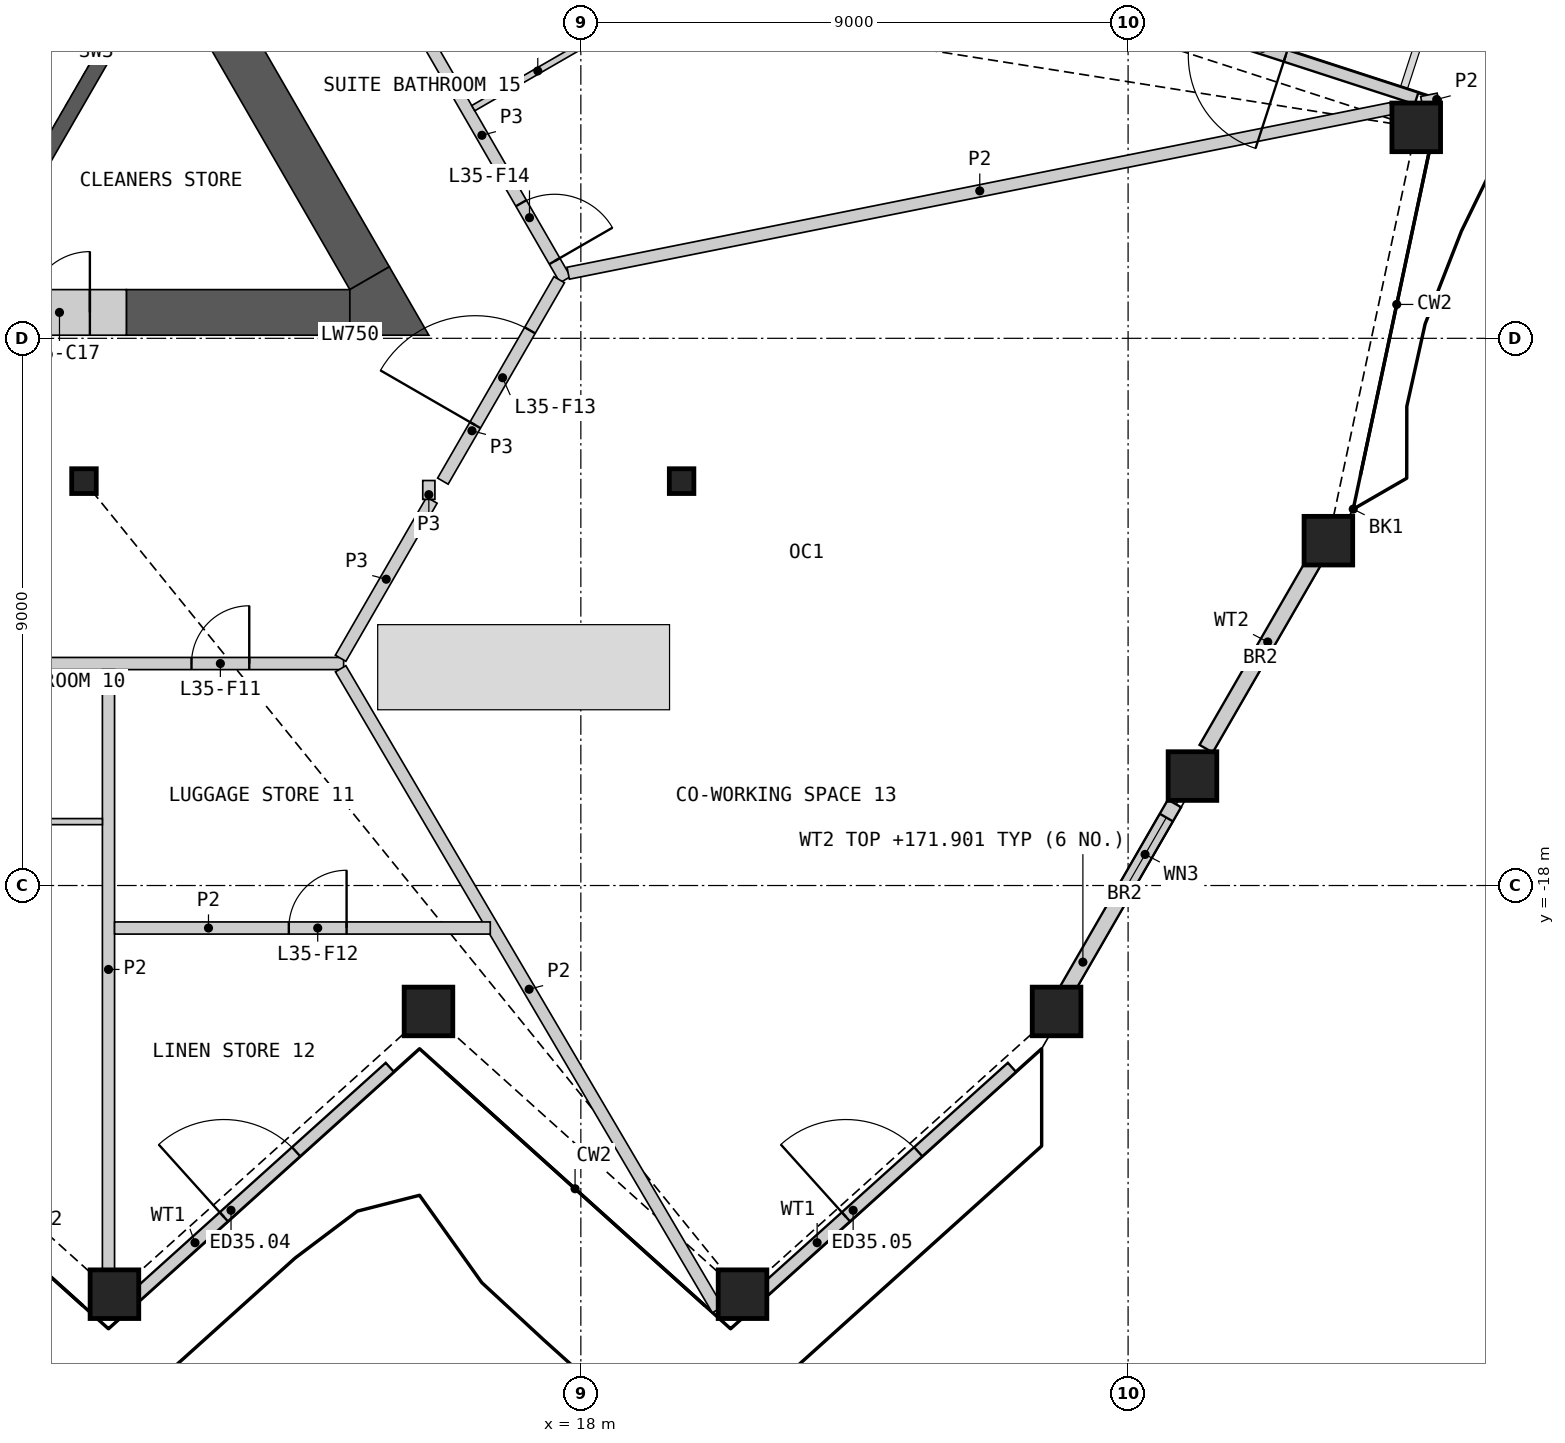
"""IFC4 building model, lengths in metres.
Left out: names, types, materials, properties, quantities, classifications, styles, units other than length and angle.
Written with IfcOpenShell. Run it as: python <this file> out.ifc"""

import sys

from ifc_helpers import new_model, si_unit, direction, frame, frame_2d, origin, origin_2d, place, context, subcontext, project, spatial, polyline, rectangle, hollow_rectangle, i_section, outline, extrude, element, fill, save


model = new_model("IFC4")
c1 = context("Model", 3, precision=1e-05, world=origin(), true_north=direction((0.0, 1.0)))
c2 = subcontext(c1, "Body", "Model", "MODEL_VIEW")
j1 = project(units=[si_unit("LENGTHUNIT", "METRE"), si_unit("PLANEANGLEUNIT", "RADIAN")], contexts=[c1])
p1 = place(None, origin())
s1 = spatial("IfcSite", under=j1, at=p1, CompositionType="ELEMENT")
p2 = place(p1, origin())
s2 = spatial("IfcBuilding", under=s1, at=p2, CompositionType="ELEMENT")
p3 = place(p2, frame((0.0, 0.0, 169.2)))
s3 = spatial("IfcBuildingStorey", under=s2, at=p3, CompositionType="ELEMENT", Elevation=169.2)
for number, where, z_axis, x_axis in (
    (1, (10.329, -24.722, 0.0), (0.0, 0.0, 1.0), (1.0, 0.0, 0.0)),
    (2, (15.494, -20.071, 0.0), (0.0, 0.0, 1.0), (1.0, 0.0, 0.0)),
    (3, (20.659, -24.722, 0.0), (0.0, 0.0, 1.0), (1.0, 0.0, 0.0)),
    (4, (25.823, -20.071, 0.0), (0.0, 0.0, 1.0), (1.0, 0.0, 0.0)),
    (5, (28.059, -16.2, 0.0), (0.0, 0.0, 1.0), (1.0, 0.0, 0.0)),
    (6, (30.294, -12.328, 0.0), (0.0, 0.0, 1.0), (1.0, 0.0, 0.0)),
    (7, (31.739, -5.53, 0.0), (0.0, 0.0, 1.0), (1.0, 0.0, 0.0)),
):
    element("IfcColumn", number, at=place(p3, frame(where, z_axis=z_axis, x_axis=x_axis)), inside=s3, PredefinedType="COLUMN", context=c2, shape_type="SweptSolid", body=[
        extrude(hollow_rectangle(XDim=0.8, YDim=0.8, WallThickness=0.05, at=origin_2d()), origin(), (0.0, 0.0, 1.0), 3.6),
    ])
for number, where, z_axis, x_axis in (
    (8, (9.828, -11.349, 0.0), (0.0, 0.0, 1.0), (1.0, 0.0, 0.0)),
    (9, (19.657, -11.349, 0.0), (0.0, 0.0, 1.0), (1.0, 0.0, 0.0)),
):
    element("IfcColumn", number, at=place(p3, frame(where, z_axis=z_axis, x_axis=x_axis)), inside=s3, PredefinedType="COLUMN", context=c2, shape_type="SweptSolid", body=[
        extrude(i_section(OverallWidth=0.404, OverallDepth=0.407, WebThickness=0.027, FlangeThickness=0.044, at=origin_2d()), origin(), (0.0, 0.0, 1.0), 3.6),
    ])
p4 = place(p3, frame((10.587, -24.836, 0.0), z_axis=(0.0, 0.0, 1.0), x_axis=(0.74315473474, 0.669119600844, 0.0)))
e10 = element("IfcWall", 10, at=p4, inside=s3, PredefinedType="SOLIDWALL", context=c2, shape_type="SweptSolid", body=[
    extrude(rectangle(XDim=5.748, YDim=0.2, at=frame_2d((2.874, 0.0))), origin(), (0.0, 0.0, 1.0), 2.701),
])
p5 = place(p4, frame((2.074, 0.0, 0.0)))
e11 = element("IfcOpeningElement", 11, at=p5, cuts=e10, PredefinedType="OPENING", context=c2, shape_type="SweptSolid", body=[
    extrude(rectangle(XDim=1.6, YDim=2.4, at=frame_2d((0.8, 1.2))), frame((0.0, 0.11, 0.0), z_axis=(0.0, -1.0, 0.0), x_axis=(1.0, 0.0, 0.0)), (0.0, 0.0, 1.0), 0.22),
])
p6 = place(p3, frame((20.818, -24.836, 0.0), z_axis=(0.0, 0.0, 1.0), x_axis=(0.74315473474, 0.669119600844, 0.0)))
e12 = element("IfcWall", 12, at=p6, inside=s3, PredefinedType="SOLIDWALL", context=c2, shape_type="SweptSolid", body=[
    extrude(rectangle(XDim=5.748, YDim=0.2, at=frame_2d((2.874, 0.0))), origin(), (0.0, 0.0, 1.0), 2.701),
])
p7 = place(p6, frame((2.074, 0.0, 0.0)))
e13 = element("IfcOpeningElement", 13, at=p7, cuts=e12, PredefinedType="OPENING", context=c2, shape_type="SweptSolid", body=[
    extrude(rectangle(XDim=1.6, YDim=2.4, at=frame_2d((0.8, 1.2))), frame((0.0, 0.11, 0.0), z_axis=(0.0, -1.0, 0.0), x_axis=(1.0, 0.0, 0.0)), (0.0, 0.0, 1.0), 0.22),
])
p8 = place(p3, frame((25.754, -20.13, 0.0), z_axis=(0.0, 0.0, 1.0), x_axis=(0.500039726511, 0.866002466458, 0.0)))
e14 = element("IfcWall", 14, at=p8, inside=s3, PredefinedType="SOLIDWALL", context=c2, shape_type="SweptSolid", body=[
    extrude(rectangle(XDim=4.019, YDim=0.25, at=frame_2d((2.009, 0.0))), origin(), (0.0, 0.0, 1.0), 2.701),
])
p9 = place(p8, frame((2.35, 0.0, 1.7)))
e15 = element("IfcOpeningElement", 15, at=p9, cuts=e14, PredefinedType="OPENING", context=c2, shape_type="SweptSolid", body=[
    extrude(rectangle(XDim=1.4, YDim=0.8, at=frame_2d((0.7, 0.4))), frame((0.0, 0.135, 0.0), z_axis=(0.0, -1.0, 0.0), x_axis=(1.0, 0.0, 0.0)), (0.0, 0.0, 1.0), 0.27),
])
p10 = place(p3, frame((28.283, -15.75, 0.0), z_axis=(0.0, 0.0, 1.0), x_axis=(0.500005680777, 0.866022123962, 0.0)))
e16 = element("IfcWall", 16, at=p10, inside=s3, PredefinedType="SOLIDWALL", context=c2, shape_type="SweptSolid", body=[
    extrude(rectangle(XDim=4.054, YDim=0.25, at=frame_2d((2.027, 0.0))), origin(), (0.0, 0.0, 1.0), 2.701),
])
p11 = place(p3, frame((31.743, -5.054, 0.0), z_axis=(0.0, 0.0, 1.0), x_axis=(-0.951061260164, 0.309002393867, 0.0)))
e17 = element("IfcWall", 17, at=p11, inside=s3, PredefinedType="SOLIDWALL", context=c2, shape_type="SweptSolid", body=[
    extrude(rectangle(XDim=5.938, YDim=0.2, at=frame_2d((2.969, 0.0))), origin(), (0.0, 0.0, 1.0), 2.701),
])
p12 = place(p11, frame((2.264, 0.0, 0.0)))
e18 = element("IfcOpeningElement", 18, at=p12, cuts=e17, PredefinedType="OPENING", context=c2, shape_type="SweptSolid", body=[
    extrude(rectangle(XDim=1.6, YDim=2.4, at=frame_2d((0.8, 1.2))), frame((0.0, 0.11, 0.0), z_axis=(0.0, -1.0, 0.0), x_axis=(1.0, 0.0, 0.0)), (0.0, 0.0, 1.0), 0.22),
])
p13 = place(p3, origin())
e19 = element("IfcWall", 19, at=p13, inside=s3, PredefinedType="SHEAR", context=c2, shape_type="SweptSolid", body=[
    extrude(outline(polyline([(8.83, -6.881), (10.374, -4.206), (10.032, -4.298), (8.738, -6.539), (8.83, -6.881)])), origin(), (0.0, 0.0, 1.0), 3.25),
])
p14 = place(p3, origin())
e20 = element("IfcWall", 20, at=p14, inside=s3, PredefinedType="SHEAR", context=c2, shape_type="SweptSolid", body=[
    extrude(outline(polyline([(10.032, -4.298), (10.374, -4.206), (5.307, -1.281), (5.182, -1.498), (10.032, -4.298)])), origin(), (0.0, 0.0, 1.0), 3.25),
])
p15 = place(p3, frame((10.525, -8.574, 0.0), z_axis=(0.0, 0.0, 1.0), x_axis=(1.0, 0.0, 0.0)))
e21 = element("IfcWall", 21, at=p15, inside=s3, PredefinedType="SHEAR", context=c2, shape_type="SweptSolid", body=[
    extrude(rectangle(XDim=3.676, YDim=0.75, at=frame_2d((1.838, 0.0))), origin(), (0.0, 0.0, 1.0), 3.25),
])
p16 = place(p3, frame((14.526, -8.011, 0.0), z_axis=(0.0, 0.0, 1.0), x_axis=(-0.499994855372, 0.866028374016, 0.0)))
e22 = element("IfcWall", 22, at=p16, inside=s3, PredefinedType="SHEAR", context=c2, shape_type="SweptSolid", body=[
    extrude(rectangle(XDim=14.301, YDim=0.75, at=frame_2d((7.15, 0.0))), origin(), (0.0, 0.0, 1.0), 3.25),
])
p17 = place(p3, origin())
e23 = element("IfcWall", 23, at=p17, inside=s3, PredefinedType="SHEAR", context=c2, shape_type="SweptSolid", body=[
    extrude(outline(polyline([(14.201, -8.949), (14.201, -8.199), (14.851, -7.824), (15.5, -8.949), (14.201, -8.949)])), origin(), (0.0, 0.0, 1.0), 3.25),
])
p18 = place(p3, frame((8.325, -8.574, 0.0), z_axis=(0.0, 0.0, 1.0), x_axis=(1.0, 0.0, 0.0)))
e24 = element("IfcWall", 24, at=p18, inside=s3, PredefinedType="SHEAR", context=c2, shape_type="SweptSolid", body=[
    extrude(rectangle(XDim=2.2, YDim=0.75, at=frame_2d((1.1, 0.0))), origin(), (0.0, 0.0, 1.0), 3.25),
])
p19 = place(p18, frame((0.6, 0.0, 0.0)))
e25 = element("IfcOpeningElement", 25, at=p19, cuts=e24, PredefinedType="OPENING", context=c2, shape_type="SweptSolid", body=[
    extrude(rectangle(XDim=1.0, YDim=2.1, at=frame_2d((0.5, 1.05))), frame((0.0, 0.385, 0.0), z_axis=(0.0, -1.0, 0.0), x_axis=(1.0, 0.0, 0.0)), (0.0, 0.0, 1.0), 0.77),
])
p20 = place(p3, frame((-14.099, -14.349, 0.0), z_axis=(0.0, 0.0, 1.0), x_axis=(1.0, 0.0, 0.0)))
e26 = element("IfcWall", 26, at=p20, inside=s3, PredefinedType="PARTITIONING", context=c2, shape_type="SweptSolid", body=[
    extrude(rectangle(XDim=28.198, YDim=0.2, at=frame_2d((14.099, 0.0))), origin(), (0.0, 0.0, 1.0), 3.25),
])
p21 = place(p20, frame((1.552, 0.0, 0.0)))
e27 = element("IfcOpeningElement", 27, at=p21, cuts=e26, PredefinedType="OPENING", context=c2, shape_type="SweptSolid", body=[
    extrude(rectangle(XDim=0.95, YDim=2.1, at=frame_2d((0.475, 1.05))), frame((0.0, 0.11, 0.0), z_axis=(0.0, -1.0, 0.0), x_axis=(1.0, 0.0, 0.0)), (0.0, 0.0, 1.0), 0.22),
])
p22 = place(p20, frame((7.677, 0.0, 0.0)))
e28 = element("IfcOpeningElement", 28, at=p22, cuts=e26, PredefinedType="OPENING", context=c2, shape_type="SweptSolid", body=[
    extrude(rectangle(XDim=1.0, YDim=2.1, at=frame_2d((0.5, 1.05))), frame((0.0, 0.11, 0.0), z_axis=(0.0, -1.0, 0.0), x_axis=(1.0, 0.0, 0.0)), (0.0, 0.0, 1.0), 0.22),
])
p23 = place(p20, frame((9.283, 0.0, 0.0)))
e29 = element("IfcOpeningElement", 29, at=p23, cuts=e26, PredefinedType="OPENING", context=c2, shape_type="SweptSolid", body=[
    extrude(rectangle(XDim=1.0, YDim=2.1, at=frame_2d((0.5, 1.05))), frame((0.0, 0.11, 0.0), z_axis=(0.0, -1.0, 0.0), x_axis=(1.0, 0.0, 0.0)), (0.0, 0.0, 1.0), 0.22),
])
p24 = place(p20, frame((17.915, 0.0, 0.0)))
e30 = element("IfcOpeningElement", 30, at=p24, cuts=e26, PredefinedType="OPENING", context=c2, shape_type="SweptSolid", body=[
    extrude(rectangle(XDim=1.0, YDim=2.1, at=frame_2d((0.5, 1.05))), frame((0.0, 0.11, 0.0), z_axis=(0.0, -1.0, 0.0), x_axis=(1.0, 0.0, 0.0)), (0.0, 0.0, 1.0), 0.22),
])
p25 = place(p20, frame((19.521, 0.0, 0.0)))
e31 = element("IfcOpeningElement", 31, at=p25, cuts=e26, PredefinedType="OPENING", context=c2, shape_type="SweptSolid", body=[
    extrude(rectangle(XDim=1.0, YDim=2.1, at=frame_2d((0.5, 1.05))), frame((0.0, 0.11, 0.0), z_axis=(0.0, -1.0, 0.0), x_axis=(1.0, 0.0, 0.0)), (0.0, 0.0, 1.0), 0.22),
])
p26 = place(p20, frame((25.696, 0.0, 0.0)))
e32 = element("IfcOpeningElement", 32, at=p26, cuts=e26, PredefinedType="OPENING", context=c2, shape_type="SweptSolid", body=[
    extrude(rectangle(XDim=0.95, YDim=2.1, at=frame_2d((0.475, 1.05))), frame((0.0, 0.11, 0.0), z_axis=(0.0, -1.0, 0.0), x_axis=(1.0, 0.0, 0.0)), (0.0, 0.0, 1.0), 0.22),
])
p27 = place(p3, frame((15.002, -3.286, 0.0), z_axis=(0.0, 0.0, 1.0), x_axis=(0.500007607708, -0.866021011428, 0.0)))
e33 = element("IfcWall", 33, at=p27, inside=s3, PredefinedType="PARTITIONING", context=c2, shape_type="SweptSolid", body=[
    extrude(rectangle(XDim=5.484, YDim=0.2, at=frame_2d((2.742, 0.0))), origin(), (0.0, 0.0, 1.0), 3.25),
])
p28 = place(p27, frame((4.032, 0.0, 0.0)))
e34 = element("IfcOpeningElement", 34, at=p28, cuts=e33, PredefinedType="OPENING", context=c2, shape_type="SweptSolid", body=[
    extrude(rectangle(XDim=1.1, YDim=2.1, at=frame_2d((0.55, 1.05))), frame((0.0, 0.11, 0.0), z_axis=(0.0, -1.0, 0.0), x_axis=(1.0, 0.0, 0.0)), (0.0, 0.0, 1.0), 0.22),
])
p29 = place(p3, frame((15.731, -11.349, 0.0), z_axis=(0.0, 0.0, 1.0), x_axis=(0.499961815444, 0.866047448526, 0.0)))
e35 = element("IfcWall", 35, at=p29, inside=s3, PredefinedType="PARTITIONING", context=c2, shape_type="SweptSolid", body=[
    extrude(rectangle(XDim=3.826, YDim=0.2, at=frame_2d((1.913, 0.0))), origin(), (0.0, 0.0, 1.0), 3.25),
])
p30 = place(p29, frame((1.064, 0.0, 0.0)))
e36 = element("IfcOpeningElement", 36, at=p30, cuts=e35, PredefinedType="OPENING", context=c2, shape_type="SweptSolid", body=[
    extrude(rectangle(XDim=1.8, YDim=2.1, at=frame_2d((0.9, 1.05))), frame((0.0, 0.11, 0.0), z_axis=(0.0, -1.0, 0.0), x_axis=(1.0, 0.0, 0.0)), (0.0, 0.0, 1.0), 0.22),
])
p31 = place(p3, frame((14.049, -14.262, 0.0), z_axis=(0.0, 0.0, 1.0), x_axis=(0.500048608389, 0.865997337899, 0.0)))
e37 = element("IfcWall", 37, at=p31, inside=s3, PredefinedType="PARTITIONING", context=c2, shape_type="SweptSolid", body=[
    extrude(rectangle(XDim=3.002, YDim=0.2, at=frame_2d((1.501, 0.0))), origin(), (0.0, 0.0, 1.0), 3.25),
])
p32 = place(p3, frame((15.5, -11.649, 0.0), z_axis=(0.0, 0.0, 1.0), x_axis=(0.0, 1.0, 0.0)))
e38 = element("IfcWall", 38, at=p32, inside=s3, PredefinedType="PARTITIONING", context=c2, shape_type="SweptSolid", body=[
    extrude(rectangle(XDim=0.31, YDim=0.2, at=frame_2d((0.155, 0.0))), origin(), (0.0, 0.0, 1.0), 3.25),
])
p33 = place(p3, frame((17.792, -7.929, 0.0), z_axis=(0.0, 0.0, 1.0), x_axis=(0.980565709097, 0.196190953266, 0.0)))
e39 = element("IfcWall", 39, at=p33, inside=s3, PredefinedType="PARTITIONING", context=c2, shape_type="SweptSolid", body=[
    extrude(rectangle(XDim=13.805, YDim=0.2, at=frame_2d((6.903, 0.0))), origin(), (0.0, 0.0, 1.0), 2.404),
])
p34 = place(p3, frame((14.05, -14.435, 0.0), z_axis=(0.0, 0.0, 1.0), x_axis=(0.50691019554, -0.861998871031, 0.0)))
e40 = element("IfcWall", 40, at=p34, inside=s3, PredefinedType="PARTITIONING", context=c2, shape_type="SweptSolid", body=[
    extrude(rectangle(XDim=12.229, YDim=0.2, at=frame_2d((6.115, 0.0))), origin(), (0.0, 0.0, 1.0), 2.404),
])
p35 = place(p3, frame((10.231, -24.312, 0.0), z_axis=(0.0, 0.0, 1.0), x_axis=(0.0, 1.0, 0.0)))
e41 = element("IfcWall", 41, at=p35, inside=s3, PredefinedType="PARTITIONING", context=c2, shape_type="SweptSolid", body=[
    extrude(rectangle(XDim=9.863, YDim=0.2, at=frame_2d((4.931, 0.0))), origin(), (0.0, 0.0, 1.0), 2.404),
])
p36 = place(p3, frame((10.331, -18.699, 0.0), z_axis=(0.0, 0.0, 1.0), x_axis=(1.0, 0.0, 0.0)))
e42 = element("IfcWall", 42, at=p36, inside=s3, PredefinedType="PARTITIONING", context=c2, shape_type="SweptSolid", body=[
    extrude(rectangle(XDim=6.179, YDim=0.2, at=frame_2d((3.09, 0.0))), origin(), (0.0, 0.0, 1.0), 2.404),
])
p37 = place(p36, frame((2.866, 0.0, 0.0)))
e43 = element("IfcOpeningElement", 43, at=p37, cuts=e42, PredefinedType="OPENING", context=c2, shape_type="SweptSolid", body=[
    extrude(rectangle(XDim=0.95, YDim=2.1, at=frame_2d((0.475, 1.05))), frame((0.0, 0.11, 0.0), z_axis=(0.0, -1.0, 0.0), x_axis=(1.0, 0.0, 0.0)), (0.0, 0.0, 1.0), 0.22),
])
p38 = place(p3, frame((31.831, -5.12, 0.0), z_axis=(0.0, 0.0, 1.0), x_axis=(0.980512850695, 0.19645495571, 0.0)))
e44 = element("IfcWall", 44, at=p38, inside=s3, PredefinedType="PARTITIONING", context=c2, shape_type="SweptSolid", body=[
    extrude(rectangle(XDim=0.277, YDim=0.2, at=frame_2d((0.139, 0.0))), origin(), (0.0, 0.0, 1.0), 2.404),
])
p39 = place(p3, frame((7.481, -16.949, 0.0), z_axis=(0.0, 0.0, 1.0), x_axis=(1.0, 0.0, 0.0)))
e45 = element("IfcWall", 45, at=p39, inside=s3, PredefinedType="PARTITIONING", context=c2, shape_type="SweptSolid", body=[
    extrude(rectangle(XDim=2.65, YDim=0.1, at=frame_2d((1.325, 0.0))), origin(), (0.0, 0.0, 1.0), 2.404),
])
p40 = place(p39, frame((0.25, 0.0, 0.0)))
e46 = element("IfcOpeningElement", 46, at=p40, cuts=e45, PredefinedType="OPENING", context=c2, shape_type="SweptSolid", body=[
    extrude(rectangle(XDim=0.95, YDim=2.1, at=frame_2d((0.475, 1.05))), frame((0.0, 0.06, 0.0), z_axis=(0.0, -1.0, 0.0), x_axis=(1.0, 0.0, 0.0)), (0.0, 0.0, 1.0), 0.12),
])
p41 = place(p3, frame((16.231, -5.215, 0.0), z_axis=(0.0, 0.0, 1.0), x_axis=(0.866057815567, 0.499943856944, 0.0)))
e47 = element("IfcWall", 47, at=p41, inside=s3, PredefinedType="PARTITIONING", context=c2, shape_type="SweptSolid", body=[
    extrude(rectangle(XDim=2.45, YDim=0.1, at=frame_2d((1.225, 0.0))), origin(), (0.0, 0.0, 1.0), 2.404),
])
p42 = place(p5, origin())
e48 = element("IfcDoor", 48, at=p42, inside=s3, OperationType="DOUBLE_DOOR_SINGLE_SWING", PredefinedType="DOOR", context=c2, shape_type="SweptSolid", body=[
    extrude(rectangle(XDim=1.6, YDim=2.4, at=frame_2d((0.8, 1.2))), frame((0.0, 0.025, 0.0), z_axis=(0.0, -1.0, 0.0), x_axis=(1.0, 0.0, 0.0)), (0.0, 0.0, 1.0), 0.05),
])
fill(e11, e48)
p43 = place(p7, origin())
e49 = element("IfcDoor", 49, at=p43, inside=s3, OperationType="DOUBLE_DOOR_SINGLE_SWING", PredefinedType="DOOR", context=c2, shape_type="SweptSolid", body=[
    extrude(rectangle(XDim=1.6, YDim=2.4, at=frame_2d((0.8, 1.2))), frame((0.0, 0.025, 0.0), z_axis=(0.0, -1.0, 0.0), x_axis=(1.0, 0.0, 0.0)), (0.0, 0.0, 1.0), 0.05),
])
fill(e13, e49)
p44 = place(p9, origin())
e50 = element("IfcWindow", 50, at=p44, inside=s3, PartitioningType="SINGLE_PANEL", PredefinedType="WINDOW", context=c2, shape_type="SweptSolid", body=[
    extrude(rectangle(XDim=1.4, YDim=0.8, at=frame_2d((0.7, 0.4))), frame((0.0, 0.03, 0.0), z_axis=(0.0, -1.0, 0.0), x_axis=(1.0, 0.0, 0.0)), (0.0, 0.0, 1.0), 0.06),
])
fill(e15, e50)
p45 = place(p12, origin())
e51 = element("IfcDoor", 51, at=p45, inside=s3, OperationType="DOUBLE_DOOR_SINGLE_SWING", PredefinedType="DOOR", context=c2, shape_type="SweptSolid", body=[
    extrude(rectangle(XDim=1.6, YDim=2.4, at=frame_2d((0.8, 1.2))), frame((0.0, 0.025, 0.0), z_axis=(0.0, -1.0, 0.0), x_axis=(1.0, 0.0, 0.0)), (0.0, 0.0, 1.0), 0.05),
])
fill(e18, e51)
p46 = place(p19, origin())
e52 = element("IfcDoor", 52, at=p46, inside=s3, OperationType="SINGLE_SWING_RIGHT", PredefinedType="DOOR", context=c2, shape_type="SweptSolid", body=[
    extrude(rectangle(XDim=1.0, YDim=2.1, at=frame_2d((0.5, 1.05))), frame((0.0, 0.13, 0.0), z_axis=(0.0, -1.0, 0.0), x_axis=(1.0, 0.0, 0.0)), (0.0, 0.0, 1.0), 0.05),
])
fill(e25, e52)
p47 = place(p26, origin())
e53 = element("IfcDoor", 53, at=p47, inside=s3, OperationType="SINGLE_SWING_RIGHT", PredefinedType="DOOR", context=c2, shape_type="SweptSolid", body=[
    extrude(rectangle(XDim=0.95, YDim=2.1, at=frame_2d((0.475, 1.05))), frame((0.0, 0.025, 0.0), z_axis=(0.0, -1.0, 0.0), x_axis=(1.0, 0.0, 0.0)), (0.0, 0.0, 1.0), 0.05),
])
fill(e32, e53)
p48 = place(p37, origin())
e54 = element("IfcDoor", 54, at=p48, inside=s3, OperationType="SINGLE_SWING_RIGHT", PredefinedType="DOOR", context=c2, shape_type="SweptSolid", body=[
    extrude(rectangle(XDim=0.95, YDim=2.1, at=frame_2d((0.475, 1.05))), frame((0.0, 0.025, 0.0), z_axis=(0.0, -1.0, 0.0), x_axis=(1.0, 0.0, 0.0)), (0.0, 0.0, 1.0), 0.05),
])
fill(e43, e54)
p49 = place(p30, origin())
e55 = element("IfcDoor", 55, at=p49, inside=s3, OperationType="DOUBLE_DOOR_SINGLE_SWING", PredefinedType="DOOR", context=c2, shape_type="SweptSolid", body=[
    extrude(rectangle(XDim=1.8, YDim=2.1, at=frame_2d((0.9, 1.05))), frame((0.0, 0.025, 0.0), z_axis=(0.0, -1.0, 0.0), x_axis=(1.0, 0.0, 0.0)), (0.0, 0.0, 1.0), 0.05),
])
fill(e36, e55)
p50 = place(p28, origin())
e56 = element("IfcDoor", 56, at=p50, inside=s3, OperationType="SINGLE_SWING_RIGHT", PredefinedType="DOOR", context=c2, shape_type="SweptSolid", body=[
    extrude(rectangle(XDim=1.1, YDim=2.1, at=frame_2d((0.55, 1.05))), frame((0.0, 0.025, 0.0), z_axis=(0.0, -1.0, 0.0), x_axis=(1.0, 0.0, 0.0)), (0.0, 0.0, 1.0), 0.05),
])
fill(e34, e56)
save(model, sys.argv[1])
